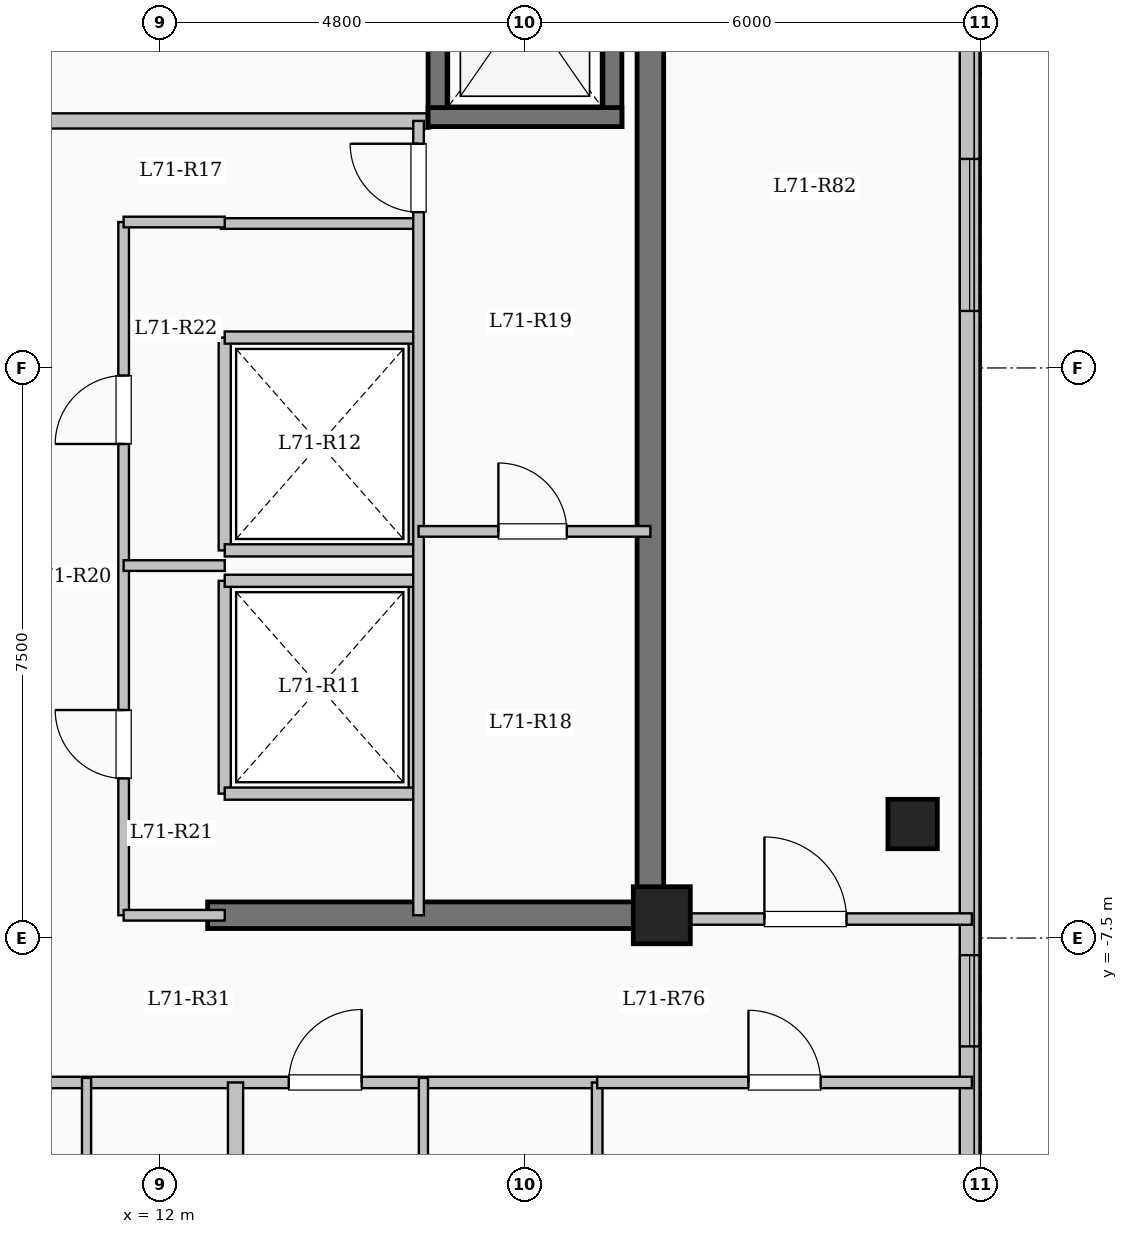
"""IFC4 building model, lengths in metres.
Left out: names, types, materials, properties, quantities, classifications, styles, units other than length and angle.
Written with IfcOpenShell. Run it as: python <this file> out.ifc"""

import sys

from ifc_helpers import new_model, si_unit, direction, frame, frame_2d, origin, origin_2d, place, context, subcontext, project, spatial, rectangle, extrude, element, fill, save


model = new_model("IFC4")
c1 = context("Model", 3, precision=1e-05, world=origin(), true_north=direction((0.0, 1.0)))
c2 = subcontext(c1, "Body", "Model", "MODEL_VIEW")
j1 = project(units=[si_unit("LENGTHUNIT", "METRE"), si_unit("PLANEANGLEUNIT", "RADIAN")], contexts=[c1])
p1 = place(None, origin())
s1 = spatial("IfcSite", under=j1, at=p1, CompositionType="ELEMENT")
p2 = place(p1, origin())
s2 = spatial("IfcBuilding", under=s1, at=p2, CompositionType="ELEMENT")
p3 = place(p2, frame((0.0, 0.0, 261.6)))
s3 = spatial("IfcBuildingStorey", under=s2, at=p3, CompositionType="ELEMENT", Elevation=261.6)
p4 = place(p3, frame((18.6, -7.2, 0.0), z_axis=(0.0, 0.0, 1.0), x_axis=(1.0, 0.0, 0.0)))
e1 = element("IfcColumn", 1, at=p4, inside=s3, PredefinedType="COLUMN", context=c2, shape_type="SweptSolid", body=[
    extrude(rectangle(XDim=0.75, YDim=0.75, at=origin_2d()), origin(), (0.0, 0.0, 1.0), 3.35),
])
p5 = place(p3, frame((21.9, -6.0, 0.0), z_axis=(0.0, 0.0, 1.0), x_axis=(1.0, 0.0, 0.0)))
e2 = element("IfcColumn", 2, at=p5, inside=s3, PredefinedType="COLUMN", context=c2, shape_type="SweptSolid", body=[
    extrude(rectangle(XDim=0.65, YDim=0.65, at=origin_2d()), origin(), (0.0, 0.0, 1.0), 3.35),
])
p6 = place(p3, frame((22.65, 17.55, 0.0), z_axis=(0.0, 0.0, 1.0), x_axis=(0.0, -1.0, 0.0)))
e3 = element("IfcWall", 3, at=p6, inside=s3, PredefinedType="SOLIDWALL", context=c2, shape_type="SweptSolid", body=[
    extrude(rectangle(XDim=35.1, YDim=0.26, at=frame_2d((17.55, 0.0))), origin(), (0.0, 0.0, 1.0), 3.1),
])
p7 = place(p6, frame((1.525, 0.0, 0.9)))
e4 = element("IfcOpeningElement", 4, at=p7, cuts=e3, PredefinedType="OPENING", context=c2, shape_type="SweptSolid", body=[
    extrude(rectangle(XDim=2.0, YDim=1.7, at=frame_2d((1.0, 0.85))), frame((0.0, 0.14, 0.0), z_axis=(0.0, -1.0, 0.0), x_axis=(1.0, 0.0, 0.0)), (0.0, 0.0, 1.0), 0.28),
])
p8 = place(p6, frame((5.425, 0.0, 0.95)))
e5 = element("IfcOpeningElement", 5, at=p8, cuts=e3, PredefinedType="OPENING", context=c2, shape_type="SweptSolid", body=[
    extrude(rectangle(XDim=1.0, YDim=1.5, at=frame_2d((0.5, 0.75))), frame((0.0, 0.14, 0.0), z_axis=(0.0, -1.0, 0.0), x_axis=(1.0, 0.0, 0.0)), (0.0, 0.0, 1.0), 0.28),
])
p9 = place(p6, frame((14.8, 0.0, 0.9)))
e6 = element("IfcOpeningElement", 6, at=p9, cuts=e3, PredefinedType="OPENING", context=c2, shape_type="SweptSolid", body=[
    extrude(rectangle(XDim=2.0, YDim=1.7, at=frame_2d((1.0, 0.85))), frame((0.0, 0.14, 0.0), z_axis=(0.0, -1.0, 0.0), x_axis=(1.0, 0.0, 0.0)), (0.0, 0.0, 1.0), 0.28),
])
p10 = place(p6, frame((25.275, 0.0, 0.95)))
e7 = element("IfcOpeningElement", 7, at=p10, cuts=e3, PredefinedType="OPENING", context=c2, shape_type="SweptSolid", body=[
    extrude(rectangle(XDim=1.2, YDim=1.5, at=frame_2d((0.6, 0.75))), frame((0.0, 0.14, 0.0), z_axis=(0.0, -1.0, 0.0), x_axis=(1.0, 0.0, 0.0)), (0.0, 0.0, 1.0), 0.28),
])
p11 = place(p6, frame((29.925, 0.0, 0.9)))
e8 = element("IfcOpeningElement", 8, at=p11, cuts=e3, PredefinedType="OPENING", context=c2, shape_type="SweptSolid", body=[
    extrude(rectangle(XDim=2.2, YDim=1.75, at=frame_2d((1.1, 0.875))), frame((0.0, 0.14, 0.0), z_axis=(0.0, -1.0, 0.0), x_axis=(1.0, 0.0, 0.0)), (0.0, 0.0, 1.0), 0.28),
])
p12 = place(p3, frame((10.15, 3.25, 0.0), z_axis=(0.0, 0.0, 1.0), x_axis=(1.0, 0.0, 0.0)))
e9 = element("IfcWall", 9, at=p12, inside=s3, PredefinedType="SOLIDWALL", context=c2, shape_type="SweptSolid", body=[
    extrude(rectangle(XDim=5.4, YDim=0.2, at=frame_2d((2.7, 0.0))), origin(), (0.0, 0.0, 1.0), 3.1),
])
p13 = place(p3, frame((15.65, 3.175, 0.0), z_axis=(0.0, 0.0, 1.0), x_axis=(0.0, 1.0, 0.0)))
e10 = element("IfcWall", 10, at=p13, inside=s3, PredefinedType="SHEAR", context=c2, shape_type="SweptSolid", body=[
    extrude(rectangle(XDim=3.25, YDim=0.25, at=frame_2d((1.625, 0.0))), origin(), (0.0, 0.0, 1.0), 3.35),
])
p14 = place(p13, frame((1.075, 0.0, 0.0)))
e11 = element("IfcOpeningElement", 11, at=p14, cuts=e10, PredefinedType="OPENING", context=c2, shape_type="SweptSolid", body=[
    extrude(rectangle(XDim=1.1, YDim=2.15, at=frame_2d((0.55, 1.075))), frame((0.0, 0.135, 0.0), z_axis=(0.0, -1.0, 0.0), x_axis=(1.0, 0.0, 0.0)), (0.0, 0.0, 1.0), 0.27),
])
p15 = place(p3, frame((17.95, 3.175, 0.0), z_axis=(0.0, 0.0, 1.0), x_axis=(0.0, 1.0, 0.0)))
e12 = element("IfcWall", 12, at=p15, inside=s3, PredefinedType="SHEAR", context=c2, shape_type="SweptSolid", body=[
    extrude(rectangle(XDim=3.25, YDim=0.25, at=frame_2d((1.625, 0.0))), origin(), (0.0, 0.0, 1.0), 3.35),
])
p16 = place(p3, frame((15.525, 3.3, 0.0), z_axis=(0.0, 0.0, 1.0), x_axis=(1.0, 0.0, 0.0)))
e13 = element("IfcWall", 13, at=p16, inside=s3, PredefinedType="SHEAR", context=c2, shape_type="SweptSolid", body=[
    extrude(rectangle(XDim=2.55, YDim=0.25, at=frame_2d((1.275, 0.0))), origin(), (0.0, 0.0, 1.0), 3.35),
])
for number, where, z_axis, x_axis in (
    (14, (12.85, -5.6, 0.0), (0.0, 0.0, 1.0), (0.0, 1.0, 0.0)),
    (15, (15.35, -5.6, 0.0), (0.0, 0.0, 1.0), (0.0, 1.0, 0.0)),
):
    element("IfcWall", number, at=place(p3, frame(where, z_axis=z_axis, x_axis=x_axis)), inside=s3, PredefinedType="SOLIDWALL", context=c2, shape_type="SweptSolid", body=[
        extrude(rectangle(XDim=2.8, YDim=0.16, at=frame_2d((1.4, 0.0))), origin(), (0.0, 0.0, 1.0), 3.1),
    ])
for number, where, z_axis, x_axis in (
    (16, (12.85, -5.6, 0.0), (0.0, 0.0, 1.0), (1.0, 0.0, 0.0)),
    (17, (12.85, -2.8, 0.0), (0.0, 0.0, 1.0), (1.0, 0.0, 0.0)),
):
    element("IfcWall", number, at=place(p3, frame(where, z_axis=z_axis, x_axis=x_axis)), inside=s3, PredefinedType="SOLIDWALL", context=c2, shape_type="SweptSolid", body=[
        extrude(rectangle(XDim=2.5, YDim=0.16, at=frame_2d((1.25, 0.0))), origin(), (0.0, 0.0, 1.0), 3.1),
    ])
for number, where, z_axis, x_axis in (
    (18, (12.85, -2.4, 0.0), (0.0, 0.0, 1.0), (0.0, 1.0, 0.0)),
    (19, (15.35, -2.4, 0.0), (0.0, 0.0, 1.0), (0.0, 1.0, 0.0)),
):
    element("IfcWall", number, at=place(p3, frame(where, z_axis=z_axis, x_axis=x_axis)), inside=s3, PredefinedType="SOLIDWALL", context=c2, shape_type="SweptSolid", body=[
        extrude(rectangle(XDim=2.8, YDim=0.16, at=frame_2d((1.4, 0.0))), origin(), (0.0, 0.0, 1.0), 3.1),
    ])
for number, where, z_axis, x_axis in (
    (20, (12.85, -2.4, 0.0), (0.0, 0.0, 1.0), (1.0, 0.0, 0.0)),
    (21, (12.85, 0.4, 0.0), (0.0, 0.0, 1.0), (1.0, 0.0, 0.0)),
):
    element("IfcWall", number, at=place(p3, frame(where, z_axis=z_axis, x_axis=x_axis)), inside=s3, PredefinedType="SOLIDWALL", context=c2, shape_type="SweptSolid", body=[
        extrude(rectangle(XDim=2.5, YDim=0.16, at=frame_2d((1.25, 0.0))), origin(), (0.0, 0.0, 1.0), 3.1),
    ])
p17 = place(p3, frame((18.45, -7.375, 0.0), z_axis=(0.0, 0.0, 1.0), x_axis=(0.0, 1.0, 0.0)))
e22 = element("IfcWall", 22, at=p17, inside=s3, PredefinedType="SHEAR", context=c2, shape_type="SweptSolid", body=[
    extrude(rectangle(XDim=14.05, YDim=0.35, at=frame_2d((7.025, 0.0))), origin(), (0.0, 0.0, 1.0), 3.35),
])
p18 = place(p3, frame((12.625, -7.2, 0.0), z_axis=(0.0, 0.0, 1.0), x_axis=(1.0, 0.0, 0.0)))
e23 = element("IfcWall", 23, at=p18, inside=s3, PredefinedType="SHEAR", context=c2, shape_type="SweptSolid", body=[
    extrude(rectangle(XDim=6.0, YDim=0.35, at=frame_2d((3.0, 0.0))), origin(), (0.0, 0.0, 1.0), 3.35),
])
p19 = place(p3, frame((12.8, 1.9, 0.0), z_axis=(0.0, 0.0, 1.0), x_axis=(1.0, 0.0, 0.0)))
e24 = element("IfcWall", 24, at=p19, inside=s3, PredefinedType="PARTITIONING", context=c2, shape_type="SweptSolid", body=[
    extrude(rectangle(XDim=2.6, YDim=0.14, at=frame_2d((1.3, 0.0))), origin(), (0.0, 0.0, 1.0), 3.1),
])
p20 = place(p3, frame((15.4, -7.2, 0.0), z_axis=(0.0, 0.0, 1.0), x_axis=(0.0, 1.0, 0.0)))
e25 = element("IfcWall", 25, at=p20, inside=s3, PredefinedType="PARTITIONING", context=c2, shape_type="SweptSolid", body=[
    extrude(rectangle(XDim=10.45, YDim=0.14, at=frame_2d((5.225, 0.0))), origin(), (0.0, 0.0, 1.0), 3.1),
])
p21 = place(p20, frame((9.25, 0.0, 0.0)))
e26 = element("IfcOpeningElement", 26, at=p21, cuts=e25, PredefinedType="OPENING", context=c2, shape_type="SweptSolid", body=[
    extrude(rectangle(XDim=0.9, YDim=2.08, at=frame_2d((0.45, 1.04))), frame((0.0, 0.08, 0.0), z_axis=(0.0, -1.0, 0.0), x_axis=(1.0, 0.0, 0.0)), (0.0, 0.0, 1.0), 0.16),
])
p22 = place(p3, frame((15.4, -2.15, 0.0), z_axis=(0.0, 0.0, 1.0), x_axis=(1.0, 0.0, 0.0)))
e27 = element("IfcWall", 27, at=p22, inside=s3, PredefinedType="PARTITIONING", context=c2, shape_type="SweptSolid", body=[
    extrude(rectangle(XDim=3.05, YDim=0.14, at=frame_2d((1.525, 0.0))), origin(), (0.0, 0.0, 1.0), 3.1),
])
p23 = place(p22, frame((1.05, 0.0, 0.0)))
e28 = element("IfcOpeningElement", 28, at=p23, cuts=e27, PredefinedType="OPENING", context=c2, shape_type="SweptSolid", body=[
    extrude(rectangle(XDim=0.9, YDim=2.08, at=frame_2d((0.45, 1.04))), frame((0.0, 0.08, 0.0), z_axis=(0.0, -1.0, 0.0), x_axis=(1.0, 0.0, 0.0)), (0.0, 0.0, 1.0), 0.16),
])
p24 = place(p3, frame((11.52, -7.2, 0.0), z_axis=(0.0, 0.0, 1.0), x_axis=(0.0, 1.0, 0.0)))
e29 = element("IfcWall", 29, at=p24, inside=s3, PredefinedType="PARTITIONING", context=c2, shape_type="SweptSolid", body=[
    extrude(rectangle(XDim=9.12, YDim=0.14, at=frame_2d((4.56, 0.0))), origin(), (0.0, 0.0, 1.0), 3.1),
])
p25 = place(p24, frame((1.8, 0.0, 0.0)))
e30 = element("IfcOpeningElement", 30, at=p25, cuts=e29, PredefinedType="OPENING", context=c2, shape_type="SweptSolid", body=[
    extrude(rectangle(XDim=0.9, YDim=2.08, at=frame_2d((0.45, 1.04))), frame((0.0, 0.08, 0.0), z_axis=(0.0, -1.0, 0.0), x_axis=(1.0, 0.0, 0.0)), (0.0, 0.0, 1.0), 0.16),
])
p26 = place(p24, frame((6.2, 0.0, 0.0)))
e31 = element("IfcOpeningElement", 31, at=p26, cuts=e29, PredefinedType="OPENING", context=c2, shape_type="SweptSolid", body=[
    extrude(rectangle(XDim=0.9, YDim=2.08, at=frame_2d((0.45, 1.04))), frame((0.0, 0.08, 0.0), z_axis=(0.0, -1.0, 0.0), x_axis=(1.0, 0.0, 0.0)), (0.0, 0.0, 1.0), 0.16),
])
p27 = place(p3, frame((11.52, 1.92, 0.0), z_axis=(0.0, 0.0, 1.0), x_axis=(1.0, 0.0, 0.0)))
e32 = element("IfcWall", 32, at=p27, inside=s3, PredefinedType="PARTITIONING", context=c2, shape_type="SweptSolid", body=[
    extrude(rectangle(XDim=1.33, YDim=0.14, at=frame_2d((0.665, 0.0))), origin(), (0.0, 0.0, 1.0), 3.1),
])
p28 = place(p3, frame((11.52, -7.2, 0.0), z_axis=(0.0, 0.0, 1.0), x_axis=(1.0, 0.0, 0.0)))
e33 = element("IfcWall", 33, at=p28, inside=s3, PredefinedType="PARTITIONING", context=c2, shape_type="SweptSolid", body=[
    extrude(rectangle(XDim=1.33, YDim=0.14, at=frame_2d((0.665, 0.0))), origin(), (0.0, 0.0, 1.0), 2.235),
])
p29 = place(p3, frame((11.52, -2.6, 0.0), z_axis=(0.0, 0.0, 1.0), x_axis=(1.0, 0.0, 0.0)))
e34 = element("IfcWall", 34, at=p29, inside=s3, PredefinedType="PARTITIONING", context=c2, shape_type="SweptSolid", body=[
    extrude(rectangle(XDim=1.33, YDim=0.14, at=frame_2d((0.665, 0.0))), origin(), (0.0, 0.0, 1.0), 3.1),
])
p30 = place(p3, frame((8.55, -9.4, 0.0), z_axis=(0.0, 0.0, 1.0), x_axis=(1.0, 0.0, 0.0)))
e35 = element("IfcWall", 35, at=p30, inside=s3, PredefinedType="PARTITIONING", context=c2, shape_type="SweptSolid", body=[
    extrude(rectangle(XDim=9.2, YDim=0.15, at=frame_2d((4.6, 0.0))), origin(), (0.0, 0.0, 1.0), 3.1),
])
p31 = place(p30, frame((0.75, 0.0, 0.0)))
e36 = element("IfcOpeningElement", 36, at=p31, cuts=e35, PredefinedType="OPENING", context=c2, shape_type="SweptSolid", body=[
    extrude(rectangle(XDim=0.96, YDim=2.15, at=frame_2d((0.48, 1.075))), frame((0.0, 0.085, 0.0), z_axis=(0.0, -1.0, 0.0), x_axis=(1.0, 0.0, 0.0)), (0.0, 0.0, 1.0), 0.17),
])
p32 = place(p30, frame((5.142, 0.0, 0.0)))
e37 = element("IfcOpeningElement", 37, at=p32, cuts=e35, PredefinedType="OPENING", context=c2, shape_type="SweptSolid", body=[
    extrude(rectangle(XDim=0.96, YDim=2.15, at=frame_2d((0.48, 1.075))), frame((0.0, 0.085, 0.0), z_axis=(0.0, -1.0, 0.0), x_axis=(1.0, 0.0, 0.0)), (0.0, 0.0, 1.0), 0.17),
])
p33 = place(p3, frame((12.992, -20.9, 0.0), z_axis=(0.0, 0.0, 1.0), x_axis=(0.0, 1.0, 0.0)))
e38 = element("IfcWall", 38, at=p33, inside=s3, PredefinedType="SOLIDWALL", context=c2, shape_type="SweptSolid", body=[
    extrude(rectangle(XDim=11.5, YDim=0.2, at=frame_2d((5.75, 0.0))), origin(), (0.0, 0.0, 1.0), 3.1),
])
p34 = place(p3, frame((11.032, -12.56, 0.0), z_axis=(0.0, 0.0, 1.0), x_axis=(0.0, 1.0, 0.0)))
e39 = element("IfcWall", 39, at=p34, inside=s3, PredefinedType="PARTITIONING", context=c2, shape_type="SweptSolid", body=[
    extrude(rectangle(XDim=3.22, YDim=0.12, at=frame_2d((1.61, 0.0))), origin(), (0.0, 0.0, 1.0), 3.1),
])
p35 = place(p34, frame((1.14, 0.0, 0.0)))
e40 = element("IfcOpeningElement", 40, at=p35, cuts=e39, PredefinedType="OPENING", context=c2, shape_type="SweptSolid", body=[
    extrude(rectangle(XDim=0.88, YDim=2.1, at=frame_2d((0.44, 1.05))), frame((0.0, 0.07, 0.0), z_axis=(0.0, -1.0, 0.0), x_axis=(1.0, 0.0, 0.0)), (0.0, 0.0, 1.0), 0.14),
])
p36 = place(p3, frame((15.464, -12.56, 0.0), z_axis=(0.0, 0.0, 1.0), x_axis=(0.0, 1.0, 0.0)))
e41 = element("IfcWall", 41, at=p36, inside=s3, PredefinedType="PARTITIONING", context=c2, shape_type="SweptSolid", body=[
    extrude(rectangle(XDim=3.22, YDim=0.12, at=frame_2d((1.61, 0.0))), origin(), (0.0, 0.0, 1.0), 3.1),
])
p37 = place(p36, frame((1.14, 0.0, 0.0)))
e42 = element("IfcOpeningElement", 42, at=p37, cuts=e41, PredefinedType="OPENING", context=c2, shape_type="SweptSolid", body=[
    extrude(rectangle(XDim=0.88, YDim=2.1, at=frame_2d((0.44, 1.05))), frame((0.0, 0.07, 0.0), z_axis=(0.0, -1.0, 0.0), x_axis=(1.0, 0.0, 0.0)), (0.0, 0.0, 1.0), 0.14),
])
p38 = place(p3, frame((18.45, -7.25, 0.0), z_axis=(0.0, 0.0, 1.0), x_axis=(1.0, 0.0, 0.0)))
e43 = element("IfcWall", 43, at=p38, inside=s3, PredefinedType="PARTITIONING", context=c2, shape_type="SweptSolid", body=[
    extrude(rectangle(XDim=4.23, YDim=0.15, at=frame_2d((2.115, 0.0))), origin(), (0.0, 0.0, 1.0), 3.1),
])
p39 = place(p38, frame((1.5, 0.0, 0.0)))
e44 = element("IfcOpeningElement", 44, at=p39, cuts=e43, PredefinedType="OPENING", context=c2, shape_type="SweptSolid", body=[
    extrude(rectangle(XDim=1.08, YDim=2.15, at=frame_2d((0.54, 1.075))), frame((0.0, 0.085, 0.0), z_axis=(0.0, -1.0, 0.0), x_axis=(1.0, 0.0, 0.0)), (0.0, 0.0, 1.0), 0.17),
])
p40 = place(p3, frame((17.75, -17.55, 0.0), z_axis=(0.0, 0.0, 1.0), x_axis=(0.0, 1.0, 0.0)))
e45 = element("IfcWall", 45, at=p40, inside=s3, PredefinedType="PARTITIONING", context=c2, shape_type="SweptSolid", body=[
    extrude(rectangle(XDim=8.15, YDim=0.14, at=frame_2d((4.075, 0.0))), origin(), (0.0, 0.0, 1.0), 3.1),
])
p41 = place(p3, frame((17.75, -9.4, 0.0), z_axis=(0.0, 0.0, 1.0), x_axis=(1.0, 0.0, 0.0)))
e46 = element("IfcWall", 46, at=p41, inside=s3, PredefinedType="PARTITIONING", context=c2, shape_type="SweptSolid", body=[
    extrude(rectangle(XDim=4.93, YDim=0.15, at=frame_2d((2.465, 0.0))), origin(), (0.0, 0.0, 1.0), 3.1),
])
p42 = place(p41, frame((1.99, 0.0, 0.0)))
e47 = element("IfcOpeningElement", 47, at=p42, cuts=e46, PredefinedType="OPENING", context=c2, shape_type="SweptSolid", body=[
    extrude(rectangle(XDim=0.95, YDim=2.15, at=frame_2d((0.475, 1.075))), frame((0.0, 0.085, 0.0), z_axis=(0.0, -1.0, 0.0), x_axis=(1.0, 0.0, 0.0)), (0.0, 0.0, 1.0), 0.17),
])
p43 = place(p9, origin())
e48 = element("IfcWindow", 48, at=p43, inside=s3, PartitioningType="SINGLE_PANEL", PredefinedType="WINDOW", context=c2, shape_type="SweptSolid", body=[
    extrude(rectangle(XDim=2.0, YDim=1.7, at=frame_2d((1.0, 0.85))), frame((0.0, 0.03, 0.0), z_axis=(0.0, -1.0, 0.0), x_axis=(1.0, 0.0, 0.0)), (0.0, 0.0, 1.0), 0.06),
])
fill(e6, e48)
p44 = place(p10, origin())
e49 = element("IfcWindow", 49, at=p44, inside=s3, PartitioningType="SINGLE_PANEL", PredefinedType="WINDOW", context=c2, shape_type="SweptSolid", body=[
    extrude(rectangle(XDim=1.2, YDim=1.5, at=frame_2d((0.6, 0.75))), frame((0.0, 0.03, 0.0), z_axis=(0.0, -1.0, 0.0), x_axis=(1.0, 0.0, 0.0)), (0.0, 0.0, 1.0), 0.06),
])
fill(e7, e49)
p45 = place(p21, origin())
e50 = element("IfcDoor", 50, at=p45, inside=s3, OperationType="SINGLE_SWING_RIGHT", PredefinedType="DOOR", context=c2, shape_type="SweptSolid", body=[
    extrude(rectangle(XDim=0.9, YDim=2.08, at=frame_2d((0.45, 1.04))), frame((0.0, 0.025, 0.0), z_axis=(0.0, -1.0, 0.0), x_axis=(1.0, 0.0, 0.0)), (0.0, 0.0, 1.0), 0.05),
])
fill(e26, e50)
p46 = place(p23, origin())
e51 = element("IfcDoor", 51, at=p46, inside=s3, OperationType="SINGLE_SWING_LEFT", PredefinedType="DOOR", context=c2, shape_type="SweptSolid", body=[
    extrude(rectangle(XDim=0.9, YDim=2.08, at=frame_2d((0.45, 1.04))), frame((0.0, 0.025, 0.0), z_axis=(0.0, -1.0, 0.0), x_axis=(1.0, 0.0, 0.0)), (0.0, 0.0, 1.0), 0.05),
])
fill(e28, e51)
p47 = place(p25, origin())
e52 = element("IfcDoor", 52, at=p47, inside=s3, OperationType="SINGLE_SWING_RIGHT", PredefinedType="DOOR", context=c2, shape_type="SweptSolid", body=[
    extrude(rectangle(XDim=0.9, YDim=2.08, at=frame_2d((0.45, 1.04))), frame((0.0, 0.025, 0.0), z_axis=(0.0, -1.0, 0.0), x_axis=(1.0, 0.0, 0.0)), (0.0, 0.0, 1.0), 0.05),
])
fill(e30, e52)
p48 = place(p26, origin())
e53 = element("IfcDoor", 53, at=p48, inside=s3, OperationType="SINGLE_SWING_LEFT", PredefinedType="DOOR", context=c2, shape_type="SweptSolid", body=[
    extrude(rectangle(XDim=0.9, YDim=2.08, at=frame_2d((0.45, 1.04))), frame((0.0, 0.025, 0.0), z_axis=(0.0, -1.0, 0.0), x_axis=(1.0, 0.0, 0.0)), (0.0, 0.0, 1.0), 0.05),
])
fill(e31, e53)
p49 = place(p32, origin())
e54 = element("IfcDoor", 54, at=p49, inside=s3, OperationType="SINGLE_SWING_RIGHT", PredefinedType="DOOR", context=c2, shape_type="SweptSolid", body=[
    extrude(rectangle(XDim=0.96, YDim=2.15, at=frame_2d((0.48, 1.075))), frame((0.0, 0.025, 0.0), z_axis=(0.0, -1.0, 0.0), x_axis=(1.0, 0.0, 0.0)), (0.0, 0.0, 1.0), 0.05),
])
fill(e37, e54)
p50 = place(p42, origin())
e55 = element("IfcDoor", 55, at=p50, inside=s3, OperationType="SINGLE_SWING_LEFT", PredefinedType="DOOR", context=c2, shape_type="SweptSolid", body=[
    extrude(rectangle(XDim=0.95, YDim=2.15, at=frame_2d((0.475, 1.075))), frame((0.0, 0.025, 0.0), z_axis=(0.0, -1.0, 0.0), x_axis=(1.0, 0.0, 0.0)), (0.0, 0.0, 1.0), 0.05),
])
fill(e47, e55)
p51 = place(p39, origin())
e56 = element("IfcDoor", 56, at=p51, inside=s3, OperationType="SINGLE_SWING_LEFT", PredefinedType="DOOR", context=c2, shape_type="SweptSolid", body=[
    extrude(rectangle(XDim=1.08, YDim=2.15, at=frame_2d((0.54, 1.075))), frame((0.0, 0.025, 0.0), z_axis=(0.0, -1.0, 0.0), x_axis=(1.0, 0.0, 0.0)), (0.0, 0.0, 1.0), 0.05),
])
fill(e44, e56)
save(model, sys.argv[1])
